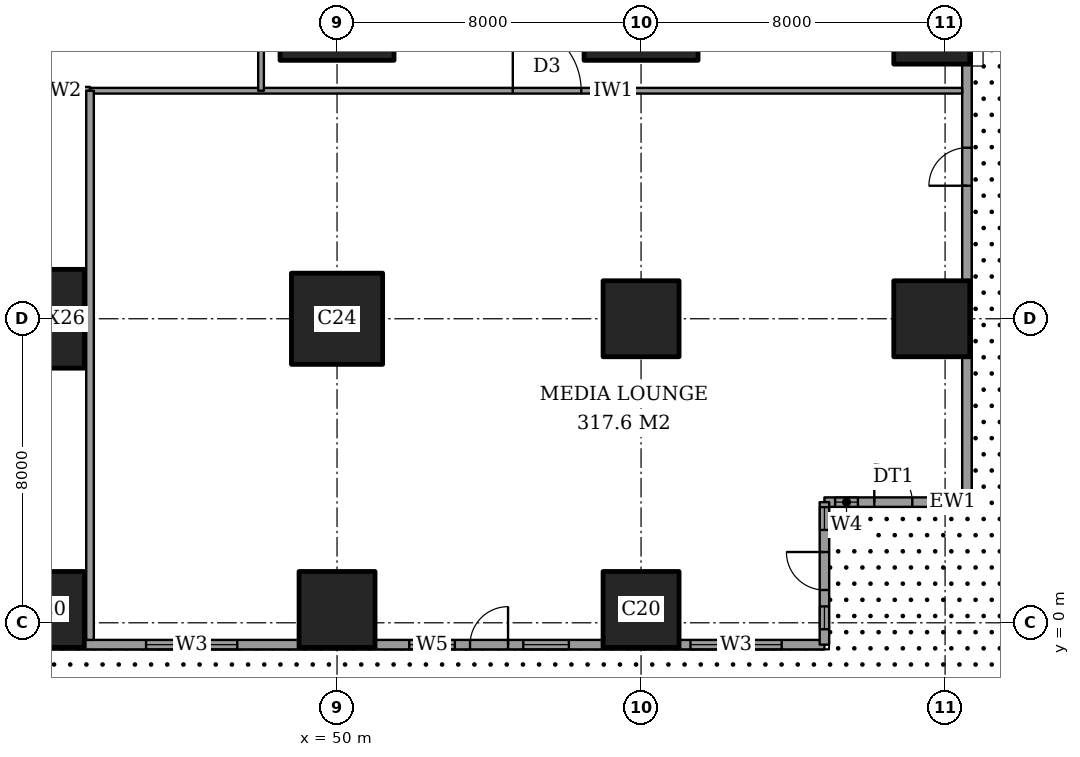
"""IFC4 building model, lengths in metres.
Left out: names, types, materials, properties, quantities, classifications, styles, units other than length and angle.
Written with IfcOpenShell. Run it as: python <this file> out.ifc"""

import sys

from ifc_helpers import new_model, si_unit, direction, frame, frame_2d, origin, origin_2d, place, context, subcontext, project, spatial, rectangle, extrude, element, fill, save


model = new_model("IFC4")
c1 = context("Model", 3, precision=1e-05, world=origin(), true_north=direction((0.0, 1.0)))
c2 = subcontext(c1, "Body", "Model", "MODEL_VIEW")
j1 = project(units=[si_unit("LENGTHUNIT", "METRE"), si_unit("PLANEANGLEUNIT", "RADIAN")], contexts=[c1])
p1 = place(None, origin())
s1 = spatial("IfcSite", under=j1, at=p1, CompositionType="ELEMENT")
p2 = place(p1, origin())
s2 = spatial("IfcBuilding", under=s1, at=p2, CompositionType="ELEMENT")
p3 = place(p2, frame((0.0, 0.0, 16.0)))
s3 = spatial("IfcBuildingStorey", under=s2, at=p3, CompositionType="ELEMENT", Elevation=16.0)
p4 = place(p3, frame((42.35, 0.35, 0.0), z_axis=(0.0, 0.0, 1.0), x_axis=(1.0, 0.0, 0.0)))
e1 = element("IfcColumn", 1, at=p4, inside=s3, PredefinedType="COLUMN", context=c2, shape_type="SweptSolid", body=[
    extrude(rectangle(XDim=2.0, YDim=2.0, at=origin_2d()), origin(), (0.0, 0.0, 1.0), 5.0),
])
p5 = place(p3, frame((42.35, 8.0, 0.0), z_axis=(0.0, 0.0, 1.0), x_axis=(1.0, 0.0, 0.0)))
e2 = element("IfcColumn", 2, at=p5, inside=s3, PredefinedType="COLUMN", context=c2, shape_type="SweptSolid", body=[
    extrude(rectangle(XDim=2.0, YDim=2.6, at=origin_2d()), origin(), (0.0, 0.0, 1.0), 5.0),
])
p6 = place(p3, frame((50.0, 0.35, 0.0), z_axis=(0.0, 0.0, 1.0), x_axis=(1.0, 0.0, 0.0)))
e3 = element("IfcColumn", 3, at=p6, inside=s3, PredefinedType="COLUMN", context=c2, shape_type="SweptSolid", body=[
    extrude(rectangle(XDim=2.0, YDim=2.0, at=origin_2d()), origin(), (0.0, 0.0, 1.0), 5.0),
])
p7 = place(p3, frame((50.0, 8.0, 0.0), z_axis=(0.0, 0.0, 1.0), x_axis=(1.0, 0.0, 0.0)))
e4 = element("IfcColumn", 4, at=p7, inside=s3, PredefinedType="COLUMN", context=c2, shape_type="SweptSolid", body=[
    extrude(rectangle(XDim=2.4, YDim=2.4, at=origin_2d()), origin(), (0.0, 0.0, 1.0), 5.0),
])
p8 = place(p3, frame((50.0, 16.0, 0.0), z_axis=(0.0, 0.0, 1.0), x_axis=(1.0, 0.0, 0.0)))
e5 = element("IfcColumn", 5, at=p8, inside=s3, PredefinedType="COLUMN", context=c2, shape_type="SweptSolid", body=[
    extrude(rectangle(XDim=3.0, YDim=2.4, at=origin_2d()), origin(), (0.0, 0.0, 1.0), 5.0),
])
for number, where, z_axis, x_axis in (
    (6, (58.0, 0.35, 0.0), (0.0, 0.0, 1.0), (1.0, 0.0, 0.0)),
    (7, (58.0, 8.0, 0.0), (0.0, 0.0, 1.0), (1.0, 0.0, 0.0)),
):
    element("IfcColumn", number, at=place(p3, frame(where, z_axis=z_axis, x_axis=x_axis)), inside=s3, PredefinedType="COLUMN", context=c2, shape_type="SweptSolid", body=[
        extrude(rectangle(XDim=2.0, YDim=2.0, at=origin_2d()), origin(), (0.0, 0.0, 1.0), 5.0),
    ])
p9 = place(p3, frame((58.0, 16.0, 0.0), z_axis=(0.0, 0.0, 1.0), x_axis=(1.0, 0.0, 0.0)))
e8 = element("IfcColumn", 8, at=p9, inside=s3, PredefinedType="COLUMN", context=c2, shape_type="SweptSolid", body=[
    extrude(rectangle(XDim=3.0, YDim=2.4, at=origin_2d()), origin(), (0.0, 0.0, 1.0), 5.0),
])
p10 = place(p3, frame((65.65, 8.0, 0.0), z_axis=(0.0, 0.0, 1.0), x_axis=(1.0, 0.0, 0.0)))
e9 = element("IfcColumn", 9, at=p10, inside=s3, PredefinedType="COLUMN", context=c2, shape_type="SweptSolid", body=[
    extrude(rectangle(XDim=2.0, YDim=2.0, at=origin_2d()), origin(), (0.0, 0.0, 1.0), 5.0),
])
p11 = place(p3, frame((65.65, 16.0, 0.0), z_axis=(0.0, 0.0, 1.0), x_axis=(0.0, 1.0, 0.0)))
e10 = element("IfcColumn", 10, at=p11, inside=s3, PredefinedType="COLUMN", context=c2, shape_type="SweptSolid", body=[
    extrude(rectangle(XDim=2.6, YDim=2.0, at=origin_2d()), origin(), (0.0, 0.0, 1.0), 5.0),
])
p12 = place(p3, frame((62.825, 3.175, 0.0), z_axis=(0.0, 0.0, 1.0), x_axis=(1.0, 0.0, 0.0)))
e11 = element("IfcWall", 11, at=p12, inside=s3, PredefinedType="SOLIDWALL", context=c2, shape_type="SweptSolid", body=[
    extrude(rectangle(XDim=3.75, YDim=0.25, at=frame_2d((1.875, 0.0))), origin(), (0.0, 0.0, 1.0), 5.0),
])
p13 = place(p12, frame((1.312, 0.0, 0.0)))
e12 = element("IfcOpeningElement", 12, at=p13, cuts=e11, PredefinedType="OPENING", context=c2, shape_type="SweptSolid", body=[
    extrude(rectangle(XDim=1.0, YDim=2.4, at=frame_2d((0.5, 1.2))), frame((0.0, 0.135, 0.0), z_axis=(0.0, -1.0, 0.0), x_axis=(1.0, 0.0, 0.0)), (0.0, 0.0, 1.0), 0.27),
])
p14 = place(p12, frame((0.281, 0.0, 0.6)))
e13 = element("IfcOpeningElement", 13, at=p14, cuts=e11, PredefinedType="OPENING", context=c2, shape_type="SweptSolid", body=[
    extrude(rectangle(XDim=0.6, YDim=3.0, at=frame_2d((0.3, 1.5))), frame((0.0, 0.135, 0.0), z_axis=(0.0, -1.0, 0.0), x_axis=(1.0, 0.0, 0.0)), (0.0, 0.0, 1.0), 0.27),
])
p15 = place(p12, frame((2.894, 0.0, 0.6)))
e14 = element("IfcOpeningElement", 14, at=p15, cuts=e11, PredefinedType="OPENING", context=c2, shape_type="SweptSolid", body=[
    extrude(rectangle(XDim=0.6, YDim=3.0, at=frame_2d((0.3, 1.5))), frame((0.0, 0.135, 0.0), z_axis=(0.0, -1.0, 0.0), x_axis=(1.0, 0.0, 0.0)), (0.0, 0.0, 1.0), 0.27),
])
p16 = place(p3, frame((66.575, 3.175, 0.0), z_axis=(0.0, 0.0, 1.0), x_axis=(0.0, 1.0, 0.0)))
e15 = element("IfcWall", 15, at=p16, inside=s3, PredefinedType="SOLIDWALL", context=c2, shape_type="SweptSolid", body=[
    extrude(rectangle(XDim=41.65, YDim=0.25, at=frame_2d((20.825, 0.0))), origin(), (0.0, 0.0, 1.0), 5.0),
])
p17 = place(p16, frame((8.325, 0.0, 0.0)))
e16 = element("IfcOpeningElement", 16, at=p17, cuts=e15, PredefinedType="OPENING", context=c2, shape_type="SweptSolid", body=[
    extrude(rectangle(XDim=1.0, YDim=2.4, at=frame_2d((0.5, 1.2))), frame((0.0, 0.135, 0.0), z_axis=(0.0, -1.0, 0.0), x_axis=(1.0, 0.0, 0.0)), (0.0, 0.0, 1.0), 0.27),
])
p18 = place(p16, frame((16.325, 0.0, 0.0)))
e17 = element("IfcOpeningElement", 17, at=p18, cuts=e15, PredefinedType="OPENING", context=c2, shape_type="SweptSolid", body=[
    extrude(rectangle(XDim=1.0, YDim=2.4, at=frame_2d((0.5, 1.2))), frame((0.0, 0.135, 0.0), z_axis=(0.0, -1.0, 0.0), x_axis=(1.0, 0.0, 0.0)), (0.0, 0.0, 1.0), 0.27),
])
p19 = place(p16, frame((23.475, 0.0, 0.6)))
e18 = element("IfcOpeningElement", 18, at=p19, cuts=e15, PredefinedType="OPENING", context=c2, shape_type="SweptSolid", body=[
    extrude(rectangle(XDim=2.4, YDim=3.0, at=frame_2d((1.2, 1.5))), frame((0.0, 0.135, 0.0), z_axis=(0.0, -1.0, 0.0), x_axis=(1.0, 0.0, 0.0)), (0.0, 0.0, 1.0), 0.27),
])
p20 = place(p16, frame((32.325, 0.0, 0.0)))
e19 = element("IfcOpeningElement", 19, at=p20, cuts=e15, PredefinedType="OPENING", context=c2, shape_type="SweptSolid", body=[
    extrude(rectangle(XDim=1.0, YDim=2.4, at=frame_2d((0.5, 1.2))), frame((0.0, 0.135, 0.0), z_axis=(0.0, -1.0, 0.0), x_axis=(1.0, 0.0, 0.0)), (0.0, 0.0, 1.0), 0.27),
])
p21 = place(p3, frame((3.175, -0.575, 0.0), z_axis=(0.0, 0.0, 1.0), x_axis=(1.0, 0.0, 0.0)))
e20 = element("IfcWall", 20, at=p21, inside=s3, PredefinedType="SOLIDWALL", context=c2, shape_type="SweptSolid", body=[
    extrude(rectangle(XDim=59.65, YDim=0.25, at=frame_2d((29.825, 0.0))), origin(), (0.0, 0.0, 1.0), 5.0),
])
p22 = place(p21, frame((8.325, 0.0, 0.0)))
e21 = element("IfcOpeningElement", 21, at=p22, cuts=e20, PredefinedType="OPENING", context=c2, shape_type="SweptSolid", body=[
    extrude(rectangle(XDim=1.0, YDim=2.4, at=frame_2d((0.5, 1.2))), frame((0.0, 0.135, 0.0), z_axis=(0.0, -1.0, 0.0), x_axis=(1.0, 0.0, 0.0)), (0.0, 0.0, 1.0), 0.27),
])
p23 = place(p21, frame((15.45, 0.0, 0.6)))
e22 = element("IfcOpeningElement", 22, at=p23, cuts=e20, PredefinedType="OPENING", context=c2, shape_type="SweptSolid", body=[
    extrude(rectangle(XDim=2.4, YDim=3.0, at=frame_2d((1.2, 1.5))), frame((0.0, 0.135, 0.0), z_axis=(0.0, -1.0, 0.0), x_axis=(1.0, 0.0, 0.0)), (0.0, 0.0, 1.0), 0.27),
])
p24 = place(p21, frame((24.825, 0.0, 0.0)))
e23 = element("IfcOpeningElement", 23, at=p24, cuts=e20, PredefinedType="OPENING", context=c2, shape_type="SweptSolid", body=[
    extrude(rectangle(XDim=1.0, YDim=2.4, at=frame_2d((0.5, 1.2))), frame((0.0, 0.135, 0.0), z_axis=(0.0, -1.0, 0.0), x_axis=(1.0, 0.0, 0.0)), (0.0, 0.0, 1.0), 0.27),
])
p25 = place(p21, frame((22.825, 0.0, 0.6)))
e24 = element("IfcOpeningElement", 24, at=p25, cuts=e20, PredefinedType="OPENING", context=c2, shape_type="SweptSolid", body=[
    extrude(rectangle(XDim=1.2, YDim=3.0, at=frame_2d((0.6, 1.5))), frame((0.0, 0.135, 0.0), z_axis=(0.0, -1.0, 0.0), x_axis=(1.0, 0.0, 0.0)), (0.0, 0.0, 1.0), 0.27),
])
p26 = place(p21, frame((26.125, 0.0, 0.6)))
e25 = element("IfcOpeningElement", 25, at=p26, cuts=e20, PredefinedType="OPENING", context=c2, shape_type="SweptSolid", body=[
    extrude(rectangle(XDim=2.4, YDim=3.0, at=frame_2d((1.2, 1.5))), frame((0.0, 0.135, 0.0), z_axis=(0.0, -1.0, 0.0), x_axis=(1.0, 0.0, 0.0)), (0.0, 0.0, 1.0), 0.27),
])
p27 = place(p21, frame((31.125, 0.0, 0.6)))
e26 = element("IfcOpeningElement", 26, at=p27, cuts=e20, PredefinedType="OPENING", context=c2, shape_type="SweptSolid", body=[
    extrude(rectangle(XDim=2.4, YDim=3.0, at=frame_2d((1.2, 1.5))), frame((0.0, 0.135, 0.0), z_axis=(0.0, -1.0, 0.0), x_axis=(1.0, 0.0, 0.0)), (0.0, 0.0, 1.0), 0.27),
])
p28 = place(p21, frame((35.025, 0.0, 0.6)))
e27 = element("IfcOpeningElement", 27, at=p28, cuts=e20, PredefinedType="OPENING", context=c2, shape_type="SweptSolid", body=[
    extrude(rectangle(XDim=2.4, YDim=3.0, at=frame_2d((1.2, 1.5))), frame((0.0, 0.135, 0.0), z_axis=(0.0, -1.0, 0.0), x_axis=(1.0, 0.0, 0.0)), (0.0, 0.0, 1.0), 0.27),
])
p29 = place(p21, frame((50.325, 0.0, 0.0)))
e28 = element("IfcOpeningElement", 28, at=p29, cuts=e20, PredefinedType="OPENING", context=c2, shape_type="SweptSolid", body=[
    extrude(rectangle(XDim=1.0, YDim=2.4, at=frame_2d((0.5, 1.2))), frame((0.0, 0.135, 0.0), z_axis=(0.0, -1.0, 0.0), x_axis=(1.0, 0.0, 0.0)), (0.0, 0.0, 1.0), 0.27),
])
p30 = place(p21, frame((41.8, 0.0, 0.6)))
e29 = element("IfcOpeningElement", 29, at=p30, cuts=e20, PredefinedType="OPENING", context=c2, shape_type="SweptSolid", body=[
    extrude(rectangle(XDim=2.4, YDim=3.0, at=frame_2d((1.2, 1.5))), frame((0.0, 0.135, 0.0), z_axis=(0.0, -1.0, 0.0), x_axis=(1.0, 0.0, 0.0)), (0.0, 0.0, 1.0), 0.27),
])
p31 = place(p21, frame((48.725, 0.0, 0.6)))
e30 = element("IfcOpeningElement", 30, at=p31, cuts=e20, PredefinedType="OPENING", context=c2, shape_type="SweptSolid", body=[
    extrude(rectangle(XDim=1.2, YDim=3.0, at=frame_2d((0.6, 1.5))), frame((0.0, 0.135, 0.0), z_axis=(0.0, -1.0, 0.0), x_axis=(1.0, 0.0, 0.0)), (0.0, 0.0, 1.0), 0.27),
])
p32 = place(p21, frame((51.725, 0.0, 0.6)))
e31 = element("IfcOpeningElement", 31, at=p32, cuts=e20, PredefinedType="OPENING", context=c2, shape_type="SweptSolid", body=[
    extrude(rectangle(XDim=1.2, YDim=3.0, at=frame_2d((0.6, 1.5))), frame((0.0, 0.135, 0.0), z_axis=(0.0, -1.0, 0.0), x_axis=(1.0, 0.0, 0.0)), (0.0, 0.0, 1.0), 0.27),
])
p33 = place(p21, frame((56.125, 0.0, 0.6)))
e32 = element("IfcOpeningElement", 32, at=p33, cuts=e20, PredefinedType="OPENING", context=c2, shape_type="SweptSolid", body=[
    extrude(rectangle(XDim=2.4, YDim=3.0, at=frame_2d((1.2, 1.5))), frame((0.0, 0.135, 0.0), z_axis=(0.0, -1.0, 0.0), x_axis=(1.0, 0.0, 0.0)), (0.0, 0.0, 1.0), 0.27),
])
p34 = place(p3, frame((62.825, -0.575, 0.0), z_axis=(0.0, 0.0, 1.0), x_axis=(0.0, 1.0, 0.0)))
e33 = element("IfcWall", 33, at=p34, inside=s3, PredefinedType="SOLIDWALL", context=c2, shape_type="SweptSolid", body=[
    extrude(rectangle(XDim=3.75, YDim=0.25, at=frame_2d((1.875, 0.0))), origin(), (0.0, 0.0, 1.0), 5.0),
])
p35 = place(p34, frame((1.438, 0.0, 0.0)))
e34 = element("IfcOpeningElement", 34, at=p35, cuts=e33, PredefinedType="OPENING", context=c2, shape_type="SweptSolid", body=[
    extrude(rectangle(XDim=1.0, YDim=2.4, at=frame_2d((0.5, 1.2))), frame((0.0, 0.135, 0.0), z_axis=(0.0, -1.0, 0.0), x_axis=(1.0, 0.0, 0.0)), (0.0, 0.0, 1.0), 0.27),
])
p36 = place(p34, frame((0.406, 0.0, 0.6)))
e35 = element("IfcOpeningElement", 35, at=p36, cuts=e33, PredefinedType="OPENING", context=c2, shape_type="SweptSolid", body=[
    extrude(rectangle(XDim=0.6, YDim=3.0, at=frame_2d((0.3, 1.5))), frame((0.0, 0.135, 0.0), z_axis=(0.0, -1.0, 0.0), x_axis=(1.0, 0.0, 0.0)), (0.0, 0.0, 1.0), 0.27),
])
p37 = place(p34, frame((3.019, 0.0, 0.6)))
e36 = element("IfcOpeningElement", 36, at=p37, cuts=e33, PredefinedType="OPENING", context=c2, shape_type="SweptSolid", body=[
    extrude(rectangle(XDim=0.6, YDim=3.0, at=frame_2d((0.3, 1.5))), frame((0.0, 0.135, 0.0), z_axis=(0.0, -1.0, 0.0), x_axis=(1.0, 0.0, 0.0)), (0.0, 0.0, 1.0), 0.27),
])
p38 = place(p3, frame((42.0, 14.0, 0.0), z_axis=(0.0, 0.0, 1.0), x_axis=(1.0, 0.0, 0.0)))
e37 = element("IfcWall", 37, at=p38, inside=s3, PredefinedType="PARTITIONING", context=c2, shape_type="SweptSolid", body=[
    extrude(rectangle(XDim=1.5, YDim=0.2, at=frame_2d((0.75, 0.0))), origin(), (0.0, 0.0, 1.0), 4.7),
])
p39 = place(p3, frame((43.5, 14.0, 0.0), z_axis=(0.0, 0.0, 1.0), x_axis=(1.0, 0.0, 0.0)))
e38 = element("IfcWall", 38, at=p39, inside=s3, PredefinedType="PARTITIONING", context=c2, shape_type="SweptSolid", body=[
    extrude(rectangle(XDim=22.95, YDim=0.15, at=frame_2d((11.475, 0.0))), origin(), (0.0, 0.0, 1.0), 4.7),
])
p40 = place(p39, frame((11.125, 0.0, 0.0)))
e39 = element("IfcOpeningElement", 39, at=p40, cuts=e38, PredefinedType="OPENING", context=c2, shape_type="SweptSolid", body=[
    extrude(rectangle(XDim=1.8, YDim=2.1, at=frame_2d((0.9, 1.05))), frame((0.0, 0.085, 0.0), z_axis=(0.0, -1.0, 0.0), x_axis=(1.0, 0.0, 0.0)), (0.0, 0.0, 1.0), 0.17),
])
p41 = place(p3, frame((43.5, -0.45, 0.0), z_axis=(0.0, 0.0, 1.0), x_axis=(0.0, 1.0, 0.0)))
e40 = element("IfcWall", 40, at=p41, inside=s3, PredefinedType="PARTITIONING", context=c2, shape_type="SweptSolid", body=[
    extrude(rectangle(XDim=14.45, YDim=0.2, at=frame_2d((7.225, 0.0))), origin(), (0.0, 0.0, 1.0), 4.7),
])
p42 = place(p3, frame((48.0, 14.0, 0.0), z_axis=(0.0, 0.0, 1.0), x_axis=(0.0, 1.0, 0.0)))
e41 = element("IfcWall", 41, at=p42, inside=s3, PredefinedType="PARTITIONING", context=c2, shape_type="SweptSolid", body=[
    extrude(rectangle(XDim=14.0, YDim=0.15, at=frame_2d((7.0, 0.0))), origin(), (0.0, 0.0, 1.0), 4.7),
])
p43 = place(p42, frame((12.5, 0.0, 0.0)))
e42 = element("IfcOpeningElement", 42, at=p43, cuts=e41, PredefinedType="OPENING", context=c2, shape_type="SweptSolid", body=[
    extrude(rectangle(XDim=1.0, YDim=2.1, at=frame_2d((0.5, 1.05))), frame((0.0, 0.085, 0.0), z_axis=(0.0, -1.0, 0.0), x_axis=(1.0, 0.0, 0.0)), (0.0, 0.0, 1.0), 0.17),
])
p44 = place(p42, frame((7.9, 0.0, 0.0)))
e43 = element("IfcOpeningElement", 43, at=p44, cuts=e41, PredefinedType="OPENING", context=c2, shape_type="SweptSolid", body=[
    extrude(rectangle(XDim=1.8, YDim=2.1, at=frame_2d((0.9, 1.05))), frame((0.0, 0.085, 0.0), z_axis=(0.0, -1.0, 0.0), x_axis=(1.0, 0.0, 0.0)), (0.0, 0.0, 1.0), 0.17),
])
p45 = place(p13, origin())
e44 = element("IfcDoor", 44, at=p45, inside=s3, OperationType="SINGLE_SWING_RIGHT", PredefinedType="DOOR", context=c2, shape_type="SweptSolid", body=[
    extrude(rectangle(XDim=1.0, YDim=2.4, at=frame_2d((0.5, 1.2))), frame((0.0, 0.025, 0.0), z_axis=(0.0, -1.0, 0.0), x_axis=(1.0, 0.0, 0.0)), (0.0, 0.0, 1.0), 0.05),
])
fill(e12, e44)
p46 = place(p14, origin())
e45 = element("IfcWindow", 45, at=p46, inside=s3, PartitioningType="SINGLE_PANEL", PredefinedType="WINDOW", context=c2, shape_type="SweptSolid", body=[
    extrude(rectangle(XDim=0.6, YDim=3.0, at=frame_2d((0.3, 1.5))), frame((0.0, 0.03, 0.0), z_axis=(0.0, -1.0, 0.0), x_axis=(1.0, 0.0, 0.0)), (0.0, 0.0, 1.0), 0.06),
])
fill(e13, e45)
p47 = place(p15, origin())
e46 = element("IfcWindow", 46, at=p47, inside=s3, PartitioningType="SINGLE_PANEL", PredefinedType="WINDOW", context=c2, shape_type="SweptSolid", body=[
    extrude(rectangle(XDim=0.6, YDim=3.0, at=frame_2d((0.3, 1.5))), frame((0.0, 0.03, 0.0), z_axis=(0.0, -1.0, 0.0), x_axis=(1.0, 0.0, 0.0)), (0.0, 0.0, 1.0), 0.06),
])
fill(e14, e46)
p48 = place(p17, origin())
e47 = element("IfcDoor", 47, at=p48, inside=s3, OperationType="SINGLE_SWING_RIGHT", PredefinedType="DOOR", context=c2, shape_type="SweptSolid", body=[
    extrude(rectangle(XDim=1.0, YDim=2.4, at=frame_2d((0.5, 1.2))), frame((0.0, 0.025, 0.0), z_axis=(0.0, -1.0, 0.0), x_axis=(1.0, 0.0, 0.0)), (0.0, 0.0, 1.0), 0.05),
])
fill(e16, e47)
p49 = place(p29, origin())
e48 = element("IfcDoor", 48, at=p49, inside=s3, OperationType="SINGLE_SWING_LEFT", PredefinedType="DOOR", context=c2, shape_type="SweptSolid", body=[
    extrude(rectangle(XDim=1.0, YDim=2.4, at=frame_2d((0.5, 1.2))), frame((0.0, 0.025, 0.0), z_axis=(0.0, -1.0, 0.0), x_axis=(1.0, 0.0, 0.0)), (0.0, 0.0, 1.0), 0.05),
])
fill(e28, e48)
p50 = place(p30, origin())
e49 = element("IfcWindow", 49, at=p50, inside=s3, PartitioningType="SINGLE_PANEL", PredefinedType="WINDOW", context=c2, shape_type="SweptSolid", body=[
    extrude(rectangle(XDim=2.4, YDim=3.0, at=frame_2d((1.2, 1.5))), frame((0.0, 0.03, 0.0), z_axis=(0.0, -1.0, 0.0), x_axis=(1.0, 0.0, 0.0)), (0.0, 0.0, 1.0), 0.06),
])
fill(e29, e49)
p51 = place(p31, origin())
e50 = element("IfcWindow", 50, at=p51, inside=s3, PartitioningType="SINGLE_PANEL", PredefinedType="WINDOW", context=c2, shape_type="SweptSolid", body=[
    extrude(rectangle(XDim=1.2, YDim=3.0, at=frame_2d((0.6, 1.5))), frame((0.0, 0.03, 0.0), z_axis=(0.0, -1.0, 0.0), x_axis=(1.0, 0.0, 0.0)), (0.0, 0.0, 1.0), 0.06),
])
fill(e30, e50)
p52 = place(p32, origin())
e51 = element("IfcWindow", 51, at=p52, inside=s3, PartitioningType="SINGLE_PANEL", PredefinedType="WINDOW", context=c2, shape_type="SweptSolid", body=[
    extrude(rectangle(XDim=1.2, YDim=3.0, at=frame_2d((0.6, 1.5))), frame((0.0, 0.03, 0.0), z_axis=(0.0, -1.0, 0.0), x_axis=(1.0, 0.0, 0.0)), (0.0, 0.0, 1.0), 0.06),
])
fill(e31, e51)
p53 = place(p33, origin())
e52 = element("IfcWindow", 52, at=p53, inside=s3, PartitioningType="SINGLE_PANEL", PredefinedType="WINDOW", context=c2, shape_type="SweptSolid", body=[
    extrude(rectangle(XDim=2.4, YDim=3.0, at=frame_2d((1.2, 1.5))), frame((0.0, 0.03, 0.0), z_axis=(0.0, -1.0, 0.0), x_axis=(1.0, 0.0, 0.0)), (0.0, 0.0, 1.0), 0.06),
])
fill(e32, e52)
p54 = place(p35, origin())
e53 = element("IfcDoor", 53, at=p54, inside=s3, OperationType="SINGLE_SWING_LEFT", PredefinedType="DOOR", context=c2, shape_type="SweptSolid", body=[
    extrude(rectangle(XDim=1.0, YDim=2.4, at=frame_2d((0.5, 1.2))), frame((0.0, 0.025, 0.0), z_axis=(0.0, -1.0, 0.0), x_axis=(1.0, 0.0, 0.0)), (0.0, 0.0, 1.0), 0.05),
])
fill(e34, e53)
p55 = place(p36, origin())
e54 = element("IfcWindow", 54, at=p55, inside=s3, PartitioningType="SINGLE_PANEL", PredefinedType="WINDOW", context=c2, shape_type="SweptSolid", body=[
    extrude(rectangle(XDim=0.6, YDim=3.0, at=frame_2d((0.3, 1.5))), frame((0.0, 0.03, 0.0), z_axis=(0.0, -1.0, 0.0), x_axis=(1.0, 0.0, 0.0)), (0.0, 0.0, 1.0), 0.06),
])
fill(e35, e54)
p56 = place(p37, origin())
e55 = element("IfcWindow", 55, at=p56, inside=s3, PartitioningType="SINGLE_PANEL", PredefinedType="WINDOW", context=c2, shape_type="SweptSolid", body=[
    extrude(rectangle(XDim=0.6, YDim=3.0, at=frame_2d((0.3, 1.5))), frame((0.0, 0.03, 0.0), z_axis=(0.0, -1.0, 0.0), x_axis=(1.0, 0.0, 0.0)), (0.0, 0.0, 1.0), 0.06),
])
fill(e36, e55)
p57 = place(p40, origin())
e56 = element("IfcDoor", 56, at=p57, inside=s3, OperationType="DOUBLE_DOOR_DOUBLE_SWING", PredefinedType="DOOR", context=c2, shape_type="SweptSolid", body=[
    extrude(rectangle(XDim=1.8, YDim=2.1, at=frame_2d((0.9, 1.05))), frame((0.0, 0.025, 0.0), z_axis=(0.0, -1.0, 0.0), x_axis=(1.0, 0.0, 0.0)), (0.0, 0.0, 1.0), 0.05),
])
fill(e39, e56)
save(model, sys.argv[1])
